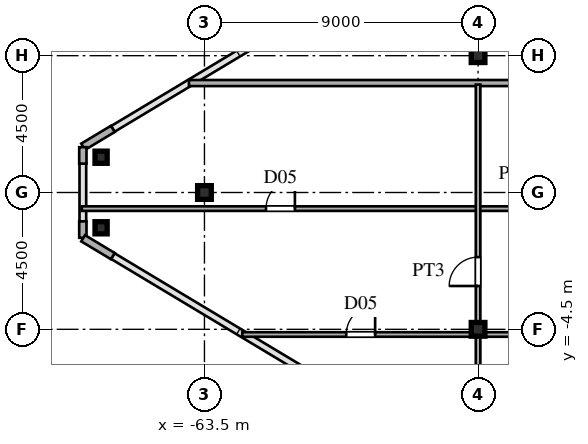
"""IFC4 building model, lengths in metres.
Left out: names, types, materials, properties, quantities, classifications, styles, units other than length and angle.
Written with IfcOpenShell. Run it as: python <this file> out.ifc"""

import sys

from ifc_helpers import new_model, si_unit, direction, frame, frame_2d, origin, origin_2d, place, context, subcontext, project, spatial, rectangle, hollow_rectangle, i_section, extrude, source, transform, mapped, element, fill, save


model = new_model("IFC4")
c1 = context("Model", 3, precision=1e-05, world=origin(), true_north=direction((0.0, 1.0)))
c2 = subcontext(c1, "Body", "Model", "MODEL_VIEW")
j1 = project(units=[si_unit("LENGTHUNIT", "METRE"), si_unit("PLANEANGLEUNIT", "RADIAN")], contexts=[c1])
p1 = place(None, origin())
s1 = spatial("IfcSite", under=j1, at=p1, CompositionType="ELEMENT")
p2 = place(p1, origin())
s2 = spatial("IfcBuilding", under=s1, at=p2, CompositionType="ELEMENT")
p3 = place(p2, frame((0.0, 0.0, 243.15)))
s3 = spatial("IfcBuildingStorey", under=s2, at=p3, CompositionType="ELEMENT", Elevation=243.15)
m1 = source(origin(), c2, "Body", "SweptSolid", [
    extrude(i_section(OverallWidth=0.45, OverallDepth=0.45, WebThickness=0.016, FlangeThickness=0.025, at=origin_2d()), origin(), (0.0, 0.0, 1.0), 3.75),
])
for number, where, z_axis, x_axis in (
    (1, (-54.5, -4.5, 0.0), (0.0, 0.0, 1.0), (1.0, 0.0, 0.0)),
    (2, (-54.5, 4.5, 0.0), (0.0, 0.0, 1.0), (1.0, 0.0, 0.0)),
    (3, (-63.5, 0.0, 0.0), (0.0, 0.0, 1.0), (1.0, 0.0, 0.0)),
):
    element("IfcColumn", number, at=place(p3, frame(where, z_axis=z_axis, x_axis=x_axis)), inside=s3, PredefinedType="COLUMN", context=c2, shape_type="MappedRepresentation", body=[
        mapped(m1, transform((0.0, 0.0, 0.0), scale=1.0)),
    ])
m2 = source(origin(), c2, "Body", "SweptSolid", [
    extrude(hollow_rectangle(XDim=0.4, YDim=0.4, WallThickness=0.016, at=origin_2d()), origin(), (0.0, 0.0, 1.0), 3.75),
])
for number, where, z_axis, x_axis in (
    (4, (-66.9, 1.16, 0.0), (0.0, 0.0, 1.0), (1.0, 0.0, 0.0)),
    (5, (-66.9, -1.16, 0.0), (0.0, 0.0, 1.0), (1.0, 0.0, 0.0)),
):
    element("IfcColumn", number, at=place(p3, frame(where, z_axis=z_axis, x_axis=x_axis)), inside=s3, PredefinedType="COLUMN", context=c2, shape_type="MappedRepresentation", body=[
        mapped(m2, transform((0.0, 0.0, 0.0), scale=1.0)),
    ])
p4 = place(p3, frame((-66.514, 2.092, 0.0), z_axis=(0.0, 0.0, 1.0), x_axis=(-0.85743623509, -0.514590228002, 0.0)))
e6 = element("IfcWall", 6, at=p4, inside=s3, PredefinedType="SOLIDWALL", context=c2, shape_type="SweptSolid", body=[
    extrude(rectangle(XDim=1.14, YDim=0.24, at=frame_2d((0.57, 0.0))), origin(), (0.0, 0.0, 1.0), 3.53),
])
for number, where, z_axis, x_axis in (
    (7, (-67.5, 1.49, 0.0), (0.0, 0.0, 1.0), (0.0, -1.0, 0.0)),
    (8, (-67.5, -0.95, 0.0), (0.0, 0.0, 1.0), (0.0, -1.0, 0.0)),
):
    element("IfcWall", number, at=place(p3, frame(where, z_axis=z_axis, x_axis=x_axis)), inside=s3, PredefinedType="SOLIDWALL", context=c2, shape_type="SweptSolid", body=[
        extrude(rectangle(XDim=0.54, YDim=0.24, at=frame_2d((0.27, 0.0))), origin(), (0.0, 0.0, 1.0), 3.53),
    ])
p5 = place(p3, frame((-67.491, -1.505, 0.0), z_axis=(0.0, 0.0, 1.0), x_axis=(0.85743623509, -0.514590228002, 0.0)))
e9 = element("IfcWall", 9, at=p5, inside=s3, PredefinedType="SOLIDWALL", context=c2, shape_type="SweptSolid", body=[
    extrude(rectangle(XDim=1.14, YDim=0.24, at=frame_2d((0.57, 0.0))), origin(), (0.0, 0.0, 1.0), 3.53),
])
p6 = place(p3, frame((-62.257, -4.67, 0.0), z_axis=(0.0, 0.0, 1.0), x_axis=(1.0, 0.0, 0.0)))
e10 = element("IfcWall", 10, at=p6, inside=s3, PredefinedType="PARTITIONING", context=c2, shape_type="SweptSolid", body=[
    extrude(rectangle(XDim=20.907, YDim=0.15, at=frame_2d((10.454, 0.0))), origin(), (0.0, 0.0, 1.0), 3.53),
])
p7 = place(p6, frame((13.882, 0.0, 0.0)))
e11 = element("IfcOpeningElement", 11, at=p7, cuts=e10, PredefinedType="OPENING", context=c2, shape_type="SweptSolid", body=[
    extrude(rectangle(XDim=0.95, YDim=2.15, at=frame_2d((0.475, 1.075))), frame((0.0, 0.085, 0.0), z_axis=(0.0, -1.0, 0.0), x_axis=(1.0, 0.0, 0.0)), (0.0, 0.0, 1.0), 0.17),
])
p8 = place(p6, frame((3.421, 0.0, 0.0)))
e12 = element("IfcOpeningElement", 12, at=p8, cuts=e10, PredefinedType="OPENING", context=c2, shape_type="SweptSolid", body=[
    extrude(rectangle(XDim=0.95, YDim=2.15, at=frame_2d((0.475, 1.075))), frame((0.0, 0.085, 0.0), z_axis=(0.0, -1.0, 0.0), x_axis=(1.0, 0.0, 0.0)), (0.0, 0.0, 1.0), 0.17),
])
p9 = place(p3, frame((-67.535, -0.53, 0.0), z_axis=(0.0, 0.0, 1.0), x_axis=(1.0, 0.0, 0.0)))
e13 = element("IfcWall", 13, at=p9, inside=s3, PredefinedType="PARTITIONING", context=c2, shape_type="SweptSolid", body=[
    extrude(rectangle(XDim=26.185, YDim=0.15, at=frame_2d((13.092, 0.0))), origin(), (0.0, 0.0, 1.0), 3.53),
])
p10 = place(p9, frame((19.16, 0.0, 0.0)))
e14 = element("IfcOpeningElement", 14, at=p10, cuts=e13, PredefinedType="OPENING", context=c2, shape_type="SweptSolid", body=[
    extrude(rectangle(XDim=0.95, YDim=2.15, at=frame_2d((0.475, 1.075))), frame((0.0, 0.085, 0.0), z_axis=(0.0, -1.0, 0.0), x_axis=(1.0, 0.0, 0.0)), (0.0, 0.0, 1.0), 0.17),
])
p11 = place(p9, frame((6.06, 0.0, 0.0)))
e15 = element("IfcOpeningElement", 15, at=p11, cuts=e13, PredefinedType="OPENING", context=c2, shape_type="SweptSolid", body=[
    extrude(rectangle(XDim=0.95, YDim=2.15, at=frame_2d((0.475, 1.075))), frame((0.0, 0.085, 0.0), z_axis=(0.0, -1.0, 0.0), x_axis=(1.0, 0.0, 0.0)), (0.0, 0.0, 1.0), 0.17),
])
p12 = place(p3, frame((-64.01, 3.6, 0.0), z_axis=(0.0, 0.0, 1.0), x_axis=(1.0, 0.0, 0.0)))
e16 = element("IfcWall", 16, at=p12, inside=s3, PredefinedType="PARTITIONING", context=c2, shape_type="SweptSolid", body=[
    extrude(rectangle(XDim=25.43, YDim=0.2, at=frame_2d((12.715, 0.0))), origin(), (0.0, 0.0, 1.0), 3.53),
])
p13 = place(p3, frame((-54.5, -8.75, 0.0), z_axis=(0.0, 0.0, 1.0), x_axis=(0.0, 1.0, 0.0)))
e17 = element("IfcWall", 17, at=p13, inside=s3, PredefinedType="PARTITIONING", context=c2, shape_type="SweptSolid", body=[
    extrude(rectangle(XDim=12.3, YDim=0.15, at=frame_2d((6.15, 0.0))), origin(), (0.0, 0.0, 1.0), 2.93),
])
p14 = place(p13, frame((5.675, 0.0, 0.0)))
e18 = element("IfcOpeningElement", 18, at=p14, cuts=e17, PredefinedType="OPENING", context=c2, shape_type="SweptSolid", body=[
    extrude(rectangle(XDim=0.95, YDim=2.15, at=frame_2d((0.475, 1.075))), frame((0.0, 0.085, 0.0), z_axis=(0.0, -1.0, 0.0), x_axis=(1.0, 0.0, 0.0)), (0.0, 0.0, 1.0), 0.17),
])
m3 = source(origin(), c2, "Body", "SweptSolid", [
    extrude(rectangle(XDim=0.95, YDim=2.15, at=frame_2d((0.475, 1.075))), frame((0.0, 0.025, 0.0), z_axis=(0.0, -1.0, 0.0), x_axis=(1.0, 0.0, 0.0)), (0.0, 0.0, 1.0), 0.05),
])
p15 = place(p8, origin())
e19 = element("IfcDoor", 19, at=p15, inside=s3, OperationType="SINGLE_SWING_RIGHT", PredefinedType="DOOR", context=c2, shape_type="MappedRepresentation", body=[
    mapped(m3, transform((0.0, 0.0, 0.0), scale=1.0)),
])
fill(e12, e19)
p16 = place(p11, origin())
e20 = element("IfcDoor", 20, at=p16, inside=s3, OperationType="SINGLE_SWING_RIGHT", PredefinedType="DOOR", context=c2, shape_type="MappedRepresentation", body=[
    mapped(m3, transform((0.0, 0.0, 0.0), scale=1.0)),
])
fill(e15, e20)
p17 = place(p14, origin())
e21 = element("IfcDoor", 21, at=p17, inside=s3, OperationType="SINGLE_SWING_LEFT", PredefinedType="DOOR", context=c2, shape_type="MappedRepresentation", body=[
    mapped(m3, transform((0.0, 0.0, 0.0), scale=1.0)),
])
fill(e18, e21)
save(model, sys.argv[1])
